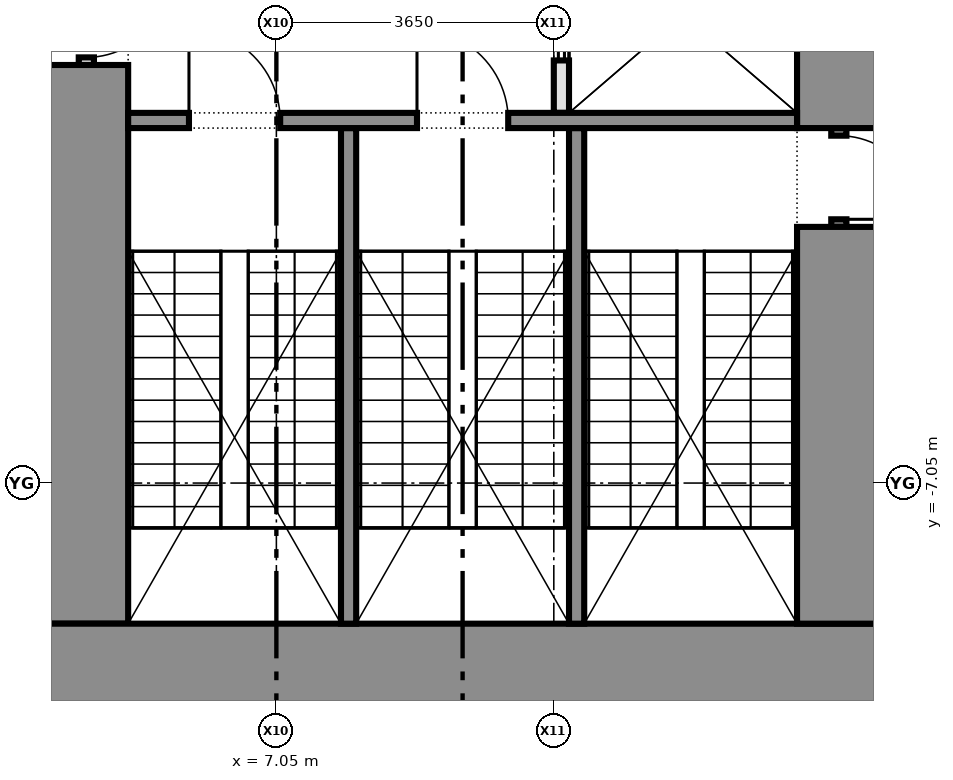
"""IFC4 building model, lengths in metres.
Left out: names, types, materials, properties, quantities, classifications, styles, units other than length and angle.
Written with IfcOpenShell. Run it as: python <this file> out.ifc"""

import sys

from ifc_helpers import new_model, si_unit, direction, frame, frame_2d, origin, place, context, subcontext, project, spatial, rectangle, extrude, element, fill, save


model = new_model("IFC4")
c1 = context("Model", 3, precision=1e-05, world=origin(), true_north=direction((0.0, 1.0)))
c2 = subcontext(c1, "Body", "Model", "MODEL_VIEW")
j1 = project(units=[si_unit("LENGTHUNIT", "METRE"), si_unit("PLANEANGLEUNIT", "RADIAN")], contexts=[c1])
p1 = place(None, origin())
s1 = spatial("IfcSite", under=j1, at=p1, CompositionType="ELEMENT")
p2 = place(p1, origin())
s2 = spatial("IfcBuilding", under=s1, at=p2, CompositionType="ELEMENT")
p3 = place(p2, frame((0.0, 0.0, 35.3)))
s3 = spatial("IfcBuildingStorey", under=s2, at=p3, CompositionType="ELEMENT", Elevation=35.3)
p4 = place(p3, frame((15.0, -9.45, 0.0), z_axis=(0.0, 0.0, 1.0), x_axis=(-1.0, 0.0, 0.0)))
e1 = element("IfcWall", 1, at=p4, inside=s3, PredefinedType="SHEAR", context=c2, shape_type="SweptSolid", body=[
    extrude(rectangle(XDim=11.0, YDim=1.1, at=frame_2d((5.5, 0.0))), origin(), (0.0, 0.0, 1.0), 4.575),
])
p5 = place(p3, frame((14.45, 3.75, 0.0), z_axis=(0.0, 0.0, 1.0), x_axis=(0.0, -1.0, 0.0)))
e2 = element("IfcWall", 2, at=p5, inside=s3, PredefinedType="SHEAR", context=c2, shape_type="SweptSolid", body=[
    extrude(rectangle(XDim=6.13, YDim=1.1, at=frame_2d((3.065, 0.0))), origin(), (0.0, 0.0, 1.0), 4.575),
])
p6 = place(p3, frame((14.45, -2.38, 0.0), z_axis=(0.0, 0.0, 1.0), x_axis=(0.0, -1.0, 0.0)))
e3 = element("IfcWall", 3, at=p6, inside=s3, PredefinedType="SHEAR", context=c2, shape_type="SweptSolid", body=[
    extrude(rectangle(XDim=1.3, YDim=0.2, at=frame_2d((0.65, 0.0))), origin(), (0.0, 0.0, 1.0), 2.4),
])
p7 = place(p6, frame((0.1, 0.0, 0.0)))
e4 = element("IfcOpeningElement", 4, at=p7, cuts=e3, PredefinedType="OPENING", context=c2, shape_type="SweptSolid", body=[
    extrude(rectangle(XDim=1.1, YDim=2.1, at=frame_2d((0.55, 1.05))), frame((0.0, 0.11, 0.0), z_axis=(0.0, -1.0, 0.0), x_axis=(1.0, 0.0, 0.0)), (0.0, 0.0, 1.0), 0.22),
])
p8 = place(p3, frame((14.45, -3.68, 0.0), z_axis=(0.0, 0.0, 1.0), x_axis=(0.0, -1.0, 0.0)))
e5 = element("IfcWall", 5, at=p8, inside=s3, PredefinedType="SHEAR", context=c2, shape_type="SweptSolid", body=[
    extrude(rectangle(XDim=5.22, YDim=1.1, at=frame_2d((2.61, 0.0))), origin(), (0.0, 0.0, 1.0), 4.575),
])
p9 = place(p3, frame((4.55, -0.25, 0.0), z_axis=(0.0, 0.0, 1.0), x_axis=(0.0, -1.0, 0.0)))
e6 = element("IfcWall", 6, at=p9, inside=s3, PredefinedType="PARTITIONING", context=c2, shape_type="SweptSolid", body=[
    extrude(rectangle(XDim=1.3, YDim=0.2, at=frame_2d((0.65, 0.0))), origin(), (0.0, 0.0, 1.0), 2.4),
])
p10 = place(p9, frame((0.1, 0.0, 0.0)))
e7 = element("IfcOpeningElement", 7, at=p10, cuts=e6, PredefinedType="OPENING", context=c2, shape_type="SweptSolid", body=[
    extrude(rectangle(XDim=1.1, YDim=2.1, at=frame_2d((0.55, 1.05))), frame((0.0, 0.11, 0.0), z_axis=(0.0, -1.0, 0.0), x_axis=(1.0, 0.0, 0.0)), (0.0, 0.0, 1.0), 0.22),
])
p11 = place(p3, frame((4.55, -1.55, 0.0), z_axis=(0.0, 0.0, 1.0), x_axis=(0.0, -1.0, 0.0)))
e8 = element("IfcWall", 8, at=p11, inside=s3, PredefinedType="SHEAR", context=c2, shape_type="SweptSolid", body=[
    extrude(rectangle(XDim=7.35, YDim=1.1, at=frame_2d((3.675, 0.0))), origin(), (0.0, 0.0, 1.0), 4.575),
])
p12 = place(p3, frame((10.8, 0.4, 0.0), z_axis=(0.0, 0.0, 1.0), x_axis=(0.0, -1.0, 0.0)))
e9 = element("IfcWall", 9, at=p12, inside=s3, PredefinedType="PARTITIONING", context=c2, shape_type="SweptSolid", body=[
    extrude(rectangle(XDim=2.58, YDim=0.2, at=frame_2d((1.29, 0.0))), origin(), (0.0, 0.0, 1.0), 4.575),
])
p13 = place(p12, frame((0.69, 0.0, 0.0)))
e10 = element("IfcOpeningElement", 10, at=p13, cuts=e9, PredefinedType="OPENING", context=c2, shape_type="SweptSolid", body=[
    extrude(rectangle(XDim=1.2, YDim=2.1, at=frame_2d((0.6, 1.05))), frame((0.0, 0.11, 0.0), z_axis=(0.0, -1.0, 0.0), x_axis=(1.0, 0.0, 0.0)), (0.0, 0.0, 1.0), 0.22),
])
p14 = place(p3, frame((13.9, -2.28, 0.0), z_axis=(0.0, 0.0, 1.0), x_axis=(-1.0, 0.0, 0.0)))
e11 = element("IfcWall", 11, at=p14, inside=s3, PredefinedType="SHEAR", context=c2, shape_type="SweptSolid", body=[
    extrude(rectangle(XDim=8.8, YDim=0.2, at=frame_2d((4.4, 0.0))), origin(), (0.0, 0.0, 1.0), 4.575),
])
p15 = place(p14, frame((3.8, 0.0, 0.0)))
e12 = element("IfcOpeningElement", 12, at=p15, cuts=e11, PredefinedType="OPENING", context=c2, shape_type="SweptSolid", body=[
    extrude(rectangle(XDim=1.2, YDim=2.1, at=frame_2d((0.6, 1.05))), frame((0.0, 0.11, 0.0), z_axis=(0.0, -1.0, 0.0), x_axis=(1.0, 0.0, 0.0)), (0.0, 0.0, 1.0), 0.22),
])
p16 = place(p14, frame((6.8, 0.0, 0.0)))
e13 = element("IfcOpeningElement", 13, at=p16, cuts=e11, PredefinedType="OPENING", context=c2, shape_type="SweptSolid", body=[
    extrude(rectangle(XDim=1.2, YDim=2.1, at=frame_2d((0.6, 1.05))), frame((0.0, 0.11, 0.0), z_axis=(0.0, -1.0, 0.0), x_axis=(1.0, 0.0, 0.0)), (0.0, 0.0, 1.0), 0.22),
])
for number, where, z_axis, x_axis in (
    (14, (11.0, -2.38, 0.0), (0.0, 0.0, 1.0), (0.0, -1.0, 0.0)),
    (15, (8.0, -2.38, 0.0), (0.0, 0.0, 1.0), (0.0, -1.0, 0.0)),
):
    element("IfcWall", number, at=place(p3, frame(where, z_axis=z_axis, x_axis=x_axis)), inside=s3, PredefinedType="SHEAR", context=c2, shape_type="SweptSolid", body=[
        extrude(rectangle(XDim=6.52, YDim=0.2, at=frame_2d((3.26, 0.0))), origin(), (0.0, 0.0, 1.0), 4.575),
    ])
p17 = place(p7, origin())
e16 = element("IfcDoor", 16, at=p17, inside=s3, OperationType="SINGLE_SWING_RIGHT", PredefinedType="DOOR", context=c2, shape_type="SweptSolid", body=[
    extrude(rectangle(XDim=1.1, YDim=2.1, at=frame_2d((0.55, 1.05))), frame((0.0, 0.025, 0.0), z_axis=(0.0, -1.0, 0.0), x_axis=(1.0, 0.0, 0.0)), (0.0, 0.0, 1.0), 0.05),
])
fill(e4, e16)
p18 = place(p10, origin())
e17 = element("IfcDoor", 17, at=p18, inside=s3, OperationType="SINGLE_SWING_LEFT", PredefinedType="DOOR", context=c2, shape_type="SweptSolid", body=[
    extrude(rectangle(XDim=1.1, YDim=2.1, at=frame_2d((0.55, 1.05))), frame((0.0, 0.025, 0.0), z_axis=(0.0, -1.0, 0.0), x_axis=(1.0, 0.0, 0.0)), (0.0, 0.0, 1.0), 0.05),
])
fill(e7, e17)
p19 = place(p13, origin())
e18 = element("IfcDoor", 18, at=p19, inside=s3, OperationType="DOUBLE_DOOR_SLIDING", PredefinedType="DOOR", context=c2, shape_type="SweptSolid", body=[
    extrude(rectangle(XDim=1.2, YDim=2.1, at=frame_2d((0.6, 1.05))), frame((0.0, 0.025, 0.0), z_axis=(0.0, -1.0, 0.0), x_axis=(1.0, 0.0, 0.0)), (0.0, 0.0, 1.0), 0.05),
])
fill(e10, e18)
p20 = place(p15, frame((1.2, 0.0, 0.0), z_axis=(0.0, 0.0, 1.0), x_axis=(-1.0, 0.0, 0.0)))
e19 = element("IfcDoor", 19, at=p20, inside=s3, OperationType="SINGLE_SWING_LEFT", PredefinedType="DOOR", context=c2, shape_type="SweptSolid", body=[
    extrude(rectangle(XDim=1.2, YDim=2.1, at=frame_2d((0.6, 1.05))), frame((0.0, 0.025, 0.0), z_axis=(0.0, -1.0, 0.0), x_axis=(1.0, 0.0, 0.0)), (0.0, 0.0, 1.0), 0.05),
])
fill(e12, e19)
p21 = place(p16, frame((1.2, 0.0, 0.0), z_axis=(0.0, 0.0, 1.0), x_axis=(-1.0, 0.0, 0.0)))
e20 = element("IfcDoor", 20, at=p21, inside=s3, OperationType="SINGLE_SWING_LEFT", PredefinedType="DOOR", context=c2, shape_type="SweptSolid", body=[
    extrude(rectangle(XDim=1.2, YDim=2.1, at=frame_2d((0.6, 1.05))), frame((0.0, 0.025, 0.0), z_axis=(0.0, -1.0, 0.0), x_axis=(1.0, 0.0, 0.0)), (0.0, 0.0, 1.0), 0.05),
])
fill(e13, e20)
save(model, sys.argv[1])
